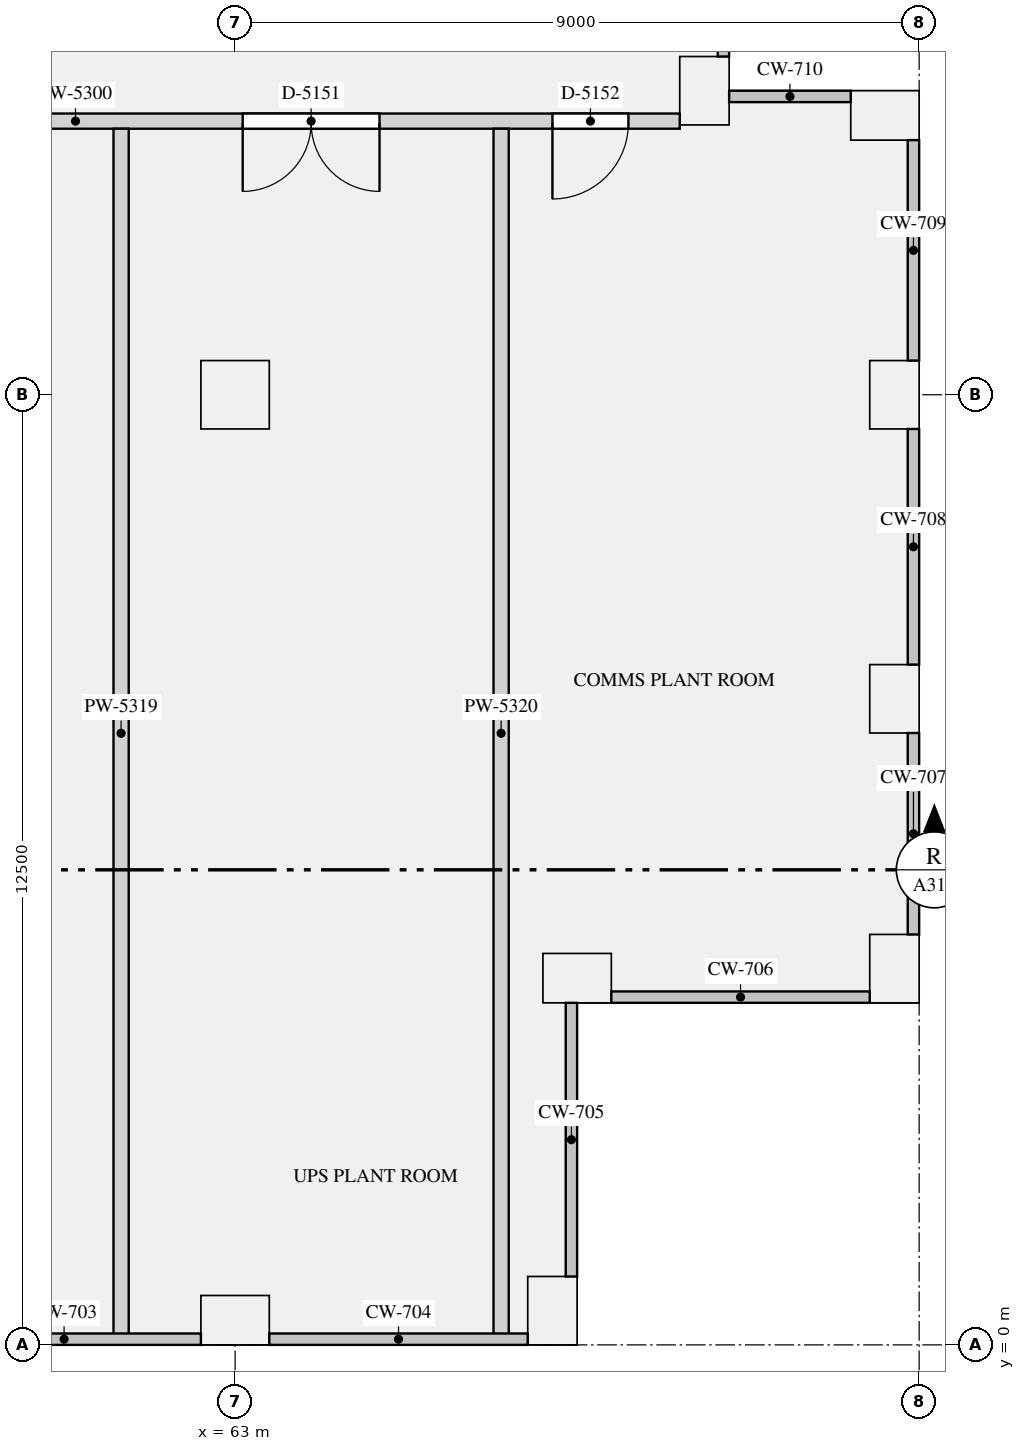
"""IFC4 building model, lengths in metres.
Left out: names, types, materials, properties, quantities, classifications, styles, units other than length and angle.
Written with IfcOpenShell. Run it as: python <this file> out.ifc"""

import sys

from ifc_helpers import new_model, si_unit, direction, frame, frame_2d, origin, origin_2d, place, context, subcontext, project, spatial, rectangle, extrude, element, fill, save


model = new_model("IFC4")
c1 = context("Model", 3, precision=1e-05, world=origin(), true_north=direction((0.0, 1.0)))
c2 = subcontext(c1, "Body", "Model", "MODEL_VIEW")
j1 = project(units=[si_unit("LENGTHUNIT", "METRE"), si_unit("PLANEANGLEUNIT", "RADIAN")], contexts=[c1])
p1 = place(None, origin())
s1 = spatial("IfcSite", under=j1, at=p1, CompositionType="ELEMENT")
p2 = place(p1, origin())
s2 = spatial("IfcBuilding", under=s1, at=p2, CompositionType="ELEMENT")
p3 = place(p2, frame((0.0, 0.0, 235.8)))
s3 = spatial("IfcBuildingStorey", under=s2, at=p3, CompositionType="ELEMENT", Elevation=235.8)
for number, where, z_axis, x_axis in (
    (1, (63.0, 0.325, 0.0), (0.0, 0.0, 1.0), (1.0, 0.0, 0.0)),
    (2, (67.175, 0.45, 0.0), (0.0, 0.0, 1.0), (0.0, 1.0, 0.0)),
    (3, (67.5, 4.825, 0.0), (0.0, 0.0, 1.0), (1.0, 0.0, 0.0)),
    (4, (71.675, 4.95, 0.0), (0.0, 0.0, 1.0), (0.0, 1.0, 0.0)),
    (5, (71.675, 8.5, 0.0), (0.0, 0.0, 1.0), (0.0, 1.0, 0.0)),
    (6, (71.675, 12.5, 0.0), (0.0, 0.0, 1.0), (0.0, 1.0, 0.0)),
    (7, (71.55, 16.175, 0.0), (0.0, 0.0, 1.0), (-1.0, 0.0, 0.0)),
    (8, (69.175, 16.5, 0.0), (0.0, 0.0, 1.0), (0.0, 1.0, 0.0)),
):
    element("IfcColumn", number, at=place(p3, frame(where, z_axis=z_axis, x_axis=x_axis)), inside=s3, PredefinedType="USERDEFINED", context=c2, shape_type="SweptSolid", body=[
        extrude(rectangle(XDim=0.9, YDim=0.65, at=origin_2d()), origin(), (0.0, 0.0, 1.0), 4.2),
    ])
p4 = place(p3, frame((63.0, 12.5, 0.0), z_axis=(0.0, 0.0, 1.0), x_axis=(1.0, 0.0, 0.0)))
e9 = element("IfcColumn", 9, at=p4, inside=s3, PredefinedType="COLUMN", context=c2, shape_type="SweptSolid", body=[
    extrude(rectangle(XDim=0.9, YDim=0.9, at=origin_2d()), origin(), (0.0, 0.0, 1.0), 4.2),
])
p5 = place(p3, frame((54.1, 16.1, 0.0), z_axis=(0.0, 0.0, 1.0), x_axis=(1.0, 0.0, 0.0)))
e10 = element("IfcWall", 10, at=p5, inside=s3, PredefinedType="PARTITIONING", context=c2, shape_type="SweptSolid", body=[
    extrude(rectangle(XDim=14.75, YDim=0.2, at=frame_2d((7.375, 0.0))), origin(), (0.0, 0.0, 1.0), 3.85),
])
p6 = place(p5, frame((2.8, 0.0, 0.0)))
e11 = element("IfcOpeningElement", 11, at=p6, cuts=e10, PredefinedType="OPENING", context=c2, shape_type="SweptSolid", body=[
    extrude(rectangle(XDim=1.8, YDim=2.1, at=frame_2d((0.9, 1.05))), frame((0.0, 0.11, 0.0), z_axis=(0.0, -1.0, 0.0), x_axis=(1.0, 0.0, 0.0)), (0.0, 0.0, 1.0), 0.22),
])
p7 = place(p5, frame((9.0, 0.0, 0.0)))
e12 = element("IfcOpeningElement", 12, at=p7, cuts=e10, PredefinedType="OPENING", context=c2, shape_type="SweptSolid", body=[
    extrude(rectangle(XDim=1.8, YDim=2.1, at=frame_2d((0.9, 1.05))), frame((0.0, 0.11, 0.0), z_axis=(0.0, -1.0, 0.0), x_axis=(1.0, 0.0, 0.0)), (0.0, 0.0, 1.0), 0.22),
])
p8 = place(p5, frame((13.075, 0.0, 0.0)))
e13 = element("IfcOpeningElement", 13, at=p8, cuts=e10, PredefinedType="OPENING", context=c2, shape_type="SweptSolid", body=[
    extrude(rectangle(XDim=1.0, YDim=2.1, at=frame_2d((0.5, 1.05))), frame((0.0, 0.11, 0.0), z_axis=(0.0, -1.0, 0.0), x_axis=(1.0, 0.0, 0.0)), (0.0, 0.0, 1.0), 0.22),
])
for number, where, z_axis, x_axis in (
    (14, (61.5, 0.093, 0.0), (0.0, 0.0, 1.0), (0.0, 1.0, 0.0)),
    (15, (66.5, 0.093, 0.0), (0.0, 0.0, 1.0), (0.0, 1.0, 0.0)),
):
    element("IfcWall", number, at=place(p3, frame(where, z_axis=z_axis, x_axis=x_axis)), inside=s3, PredefinedType="PARTITIONING", context=c2, shape_type="SweptSolid", body=[
        extrude(rectangle(XDim=15.907, YDim=0.2, at=frame_2d((7.954, 0.0))), origin(), (0.0, 0.0, 1.0), 3.85),
    ])
p9 = place(p7, frame((1.8, 0.0, 0.0), z_axis=(0.0, 0.0, 1.0), x_axis=(-1.0, 0.0, 0.0)))
e16 = element("IfcDoor", 16, at=p9, inside=s3, OperationType="DOUBLE_DOOR_SINGLE_SWING", PredefinedType="DOOR", context=c2, shape_type="SweptSolid", body=[
    extrude(rectangle(XDim=1.8, YDim=2.1, at=frame_2d((0.9, 1.05))), frame((0.0, 0.025, 0.0), z_axis=(0.0, -1.0, 0.0), x_axis=(1.0, 0.0, 0.0)), (0.0, 0.0, 1.0), 0.05),
])
fill(e12, e16)
p10 = place(p8, frame((1.0, 0.0, 0.0), z_axis=(0.0, 0.0, 1.0), x_axis=(-1.0, 0.0, 0.0)))
e17 = element("IfcDoor", 17, at=p10, inside=s3, OperationType="SINGLE_SWING_RIGHT", PredefinedType="DOOR", context=c2, shape_type="SweptSolid", body=[
    extrude(rectangle(XDim=1.0, YDim=2.1, at=frame_2d((0.5, 1.05))), frame((0.0, 0.025, 0.0), z_axis=(0.0, -1.0, 0.0), x_axis=(1.0, 0.0, 0.0)), (0.0, 0.0, 1.0), 0.05),
])
fill(e13, e17)
save(model, sys.argv[1])
